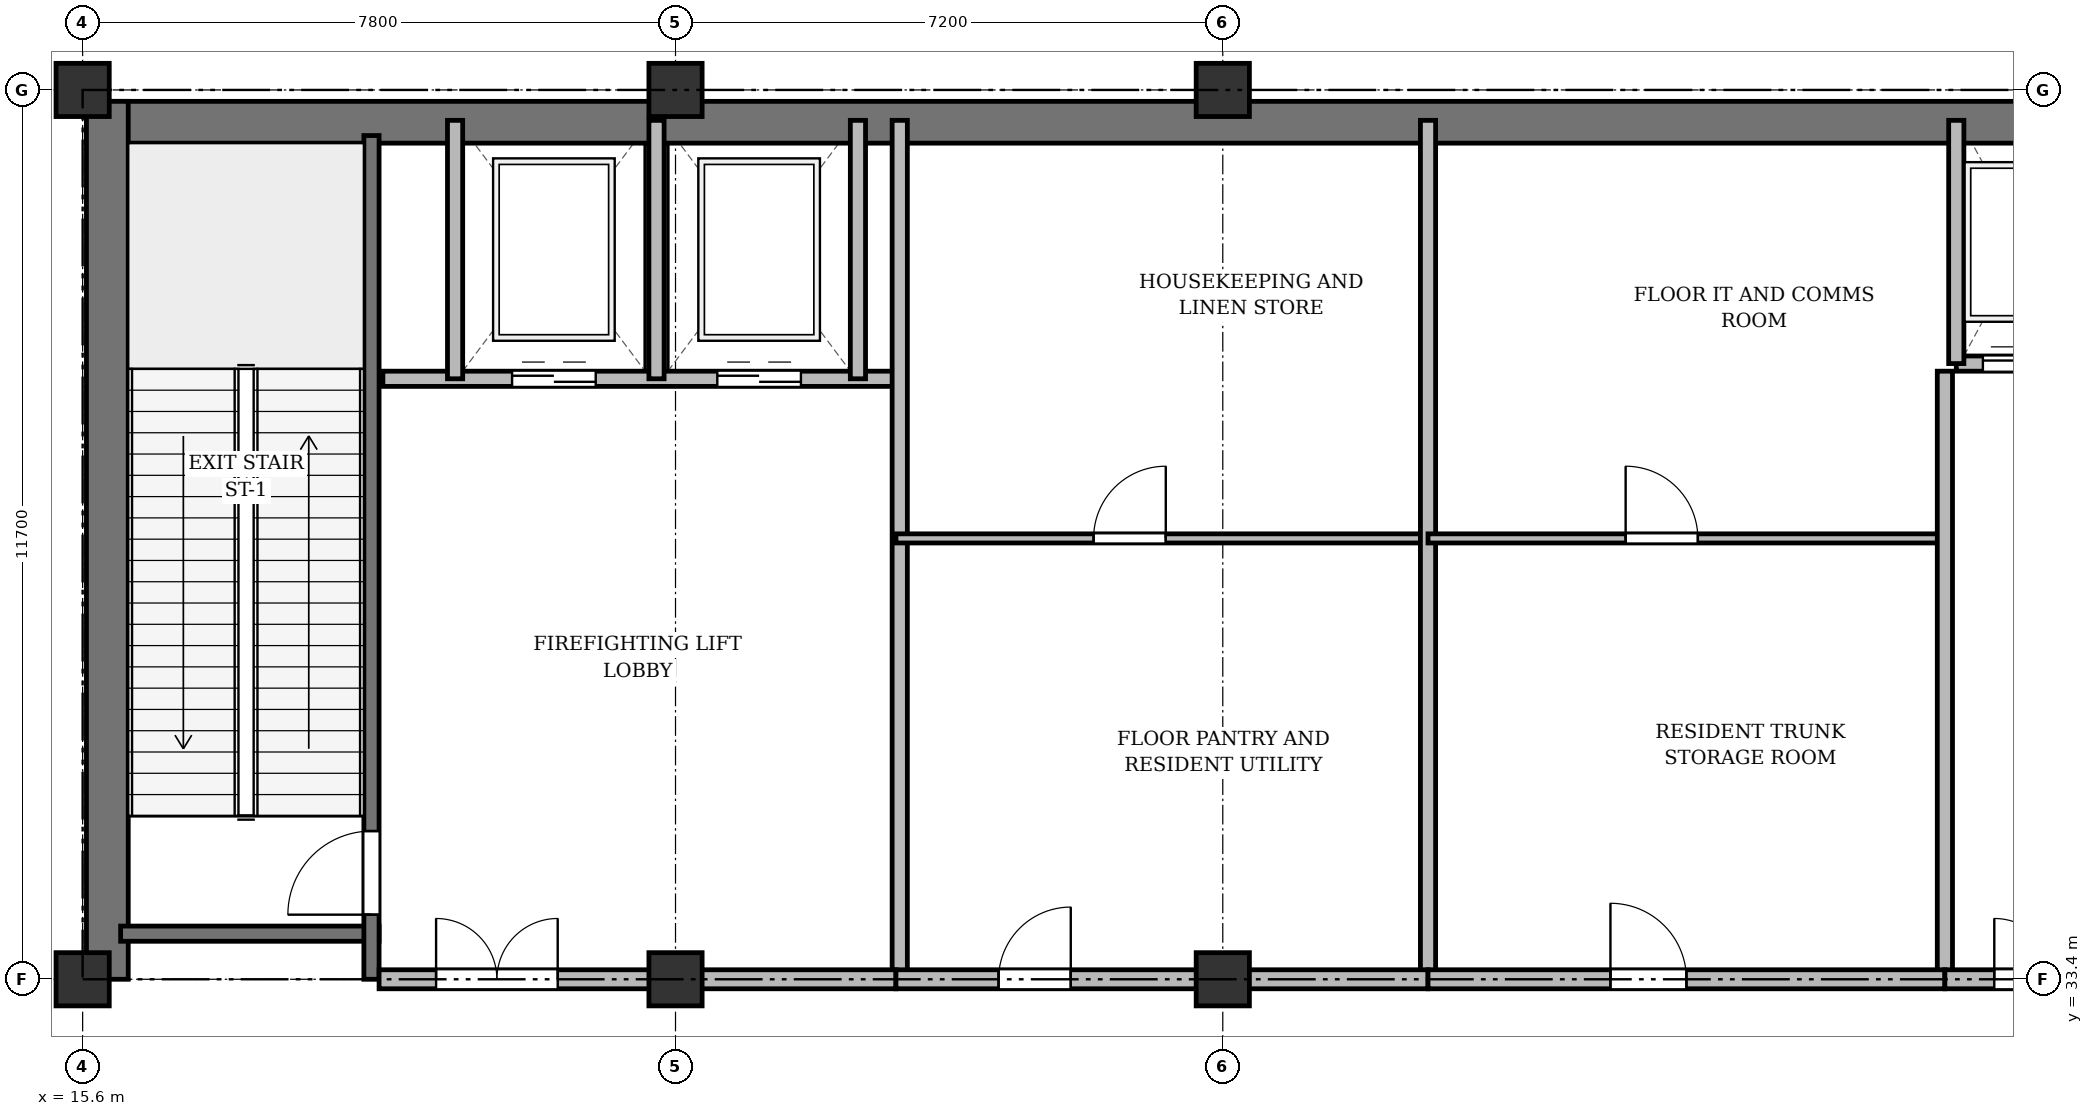
"""IFC4 building model, lengths in metres.
Left out: names, types, materials, properties, quantities, classifications, styles, units other than length and angle.
Written with IfcOpenShell. Run it as: python <this file> out.ifc"""

import sys

from ifc_helpers import new_model, si_unit, direction, frame, frame_2d, origin, origin_2d, place, context, subcontext, project, spatial, rectangle, extrude, source, transform, mapped, element, fill, save


model = new_model("IFC4")
c1 = context("Model", 3, precision=1e-05, world=origin(), true_north=direction((0.0, 1.0)))
c2 = subcontext(c1, "Body", "Model", "MODEL_VIEW")
j1 = project(units=[si_unit("LENGTHUNIT", "METRE"), si_unit("PLANEANGLEUNIT", "RADIAN")], contexts=[c1])
p1 = place(None, origin())
s1 = spatial("IfcSite", under=j1, at=p1, CompositionType="ELEMENT")
p2 = place(p1, origin())
s2 = spatial("IfcBuilding", under=s1, at=p2, CompositionType="ELEMENT")
p3 = place(p2, frame((0.0, 0.0, 240.9)))
s3 = spatial("IfcBuildingStorey", under=s2, at=p3, CompositionType="ELEMENT", Elevation=240.9)
m1 = source(origin(), c2, "Body", "SweptSolid", [
    extrude(rectangle(XDim=0.7, YDim=0.7, at=origin_2d()), origin(), (0.0, 0.0, 1.0), 7.8),
])
for number, where, z_axis, x_axis in (
    (1, (15.6, 33.4, 0.0), (0.0, 0.0, 1.0), (1.0, 0.0, 0.0)),
    (2, (15.6, 45.1, 0.0), (0.0, 0.0, 1.0), (1.0, 0.0, 0.0)),
    (3, (23.4, 33.4, 0.0), (0.0, 0.0, 1.0), (1.0, 0.0, 0.0)),
    (4, (23.4, 45.1, 0.0), (0.0, 0.0, 1.0), (1.0, 0.0, 0.0)),
    (5, (30.6, 33.4, 0.0), (0.0, 0.0, 1.0), (1.0, 0.0, 0.0)),
    (6, (30.6, 45.1, 0.0), (0.0, 0.0, 1.0), (1.0, 0.0, 0.0)),
):
    element("IfcColumn", number, at=place(p3, frame(where, z_axis=z_axis, x_axis=x_axis)), inside=s3, PredefinedType="COLUMN", context=c2, shape_type="MappedRepresentation", body=[
        mapped(m1, transform((0.0, 0.0, 0.0), x_axis=(1.0, 0.0, 0.0), y_axis=(0.0, 1.0, 0.0), z_axis=(0.0, 0.0, 1.0), scale=1.0)),
    ])
p4 = place(p3, frame((15.65, 44.675, 0.0), z_axis=(0.0, 0.0, 1.0), x_axis=(1.0, 0.0, 0.0)))
e7 = element("IfcWall", 7, at=p4, inside=s3, PredefinedType="SHEAR", context=c2, shape_type="SweptSolid", body=[
    extrude(rectangle(XDim=43.1, YDim=0.55, at=frame_2d((21.55, 0.0))), origin(), (0.0, 0.0, 1.0), 7.44),
])
p5 = place(p3, frame((15.925, 33.4, 0.0), z_axis=(0.0, 0.0, 1.0), x_axis=(0.0, 1.0, 0.0)))
e8 = element("IfcWall", 8, at=p5, inside=s3, PredefinedType="SHEAR", context=c2, shape_type="SweptSolid", body=[
    extrude(rectangle(XDim=11.55, YDim=0.55, at=frame_2d((5.775, 0.0))), origin(), (0.0, 0.0, 1.0), 7.44),
])
p6 = place(p3, frame((16.1, 34.0, 0.0), z_axis=(0.0, 0.0, 1.0), x_axis=(1.0, 0.0, 0.0)))
e9 = element("IfcWall", 9, at=p6, inside=s3, PredefinedType="SHEAR", context=c2, shape_type="SweptSolid", body=[
    extrude(rectangle(XDim=3.4, YDim=0.2, at=frame_2d((1.7, 0.0))), origin(), (0.0, 0.0, 1.0), 7.44),
])
p7 = place(p3, frame((19.4, 33.4, 0.0), z_axis=(0.0, 0.0, 1.0), x_axis=(0.0, 1.0, 0.0)))
e10 = element("IfcWall", 10, at=p7, inside=s3, PredefinedType="SHEAR", context=c2, shape_type="SweptSolid", body=[
    extrude(rectangle(XDim=11.1, YDim=0.2, at=frame_2d((5.55, 0.0))), origin(), (0.0, 0.0, 1.0), 7.44),
])
p8 = place(p7, frame((0.85, 0.0, 0.0)))
e11 = element("IfcOpeningElement", 11, at=p8, cuts=e10, PredefinedType="OPENING", context=c2, shape_type="SweptSolid", body=[
    extrude(rectangle(XDim=1.1, YDim=2.15, at=frame_2d((0.55, 1.075))), frame((0.0, 0.11, 0.0), z_axis=(0.0, -1.0, 0.0), x_axis=(1.0, 0.0, 0.0)), (0.0, 0.0, 1.0), 0.22),
])
p9 = place(p3, frame((19.55, 41.3, 0.0), z_axis=(0.0, 0.0, 1.0), x_axis=(1.0, 0.0, 0.0)))
e12 = element("IfcWall", 12, at=p9, inside=s3, PredefinedType="SOLIDWALL", context=c2, shape_type="SweptSolid", body=[
    extrude(rectangle(XDim=6.75, YDim=0.2, at=frame_2d((3.375, 0.0))), origin(), (0.0, 0.0, 1.0), 7.44),
])
p10 = place(p9, frame((1.7, 0.0, 0.0)))
e13 = element("IfcOpeningElement", 13, at=p10, cuts=e12, PredefinedType="OPENING", context=c2, shape_type="SweptSolid", body=[
    extrude(rectangle(XDim=1.1, YDim=2.15, at=frame_2d((0.55, 1.075))), frame((0.0, 0.11, 0.0), z_axis=(0.0, -1.0, 0.0), x_axis=(1.0, 0.0, 0.0)), (0.0, 0.0, 1.0), 0.22),
])
p11 = place(p9, frame((4.4, 0.0, 0.0)))
e14 = element("IfcOpeningElement", 14, at=p11, cuts=e12, PredefinedType="OPENING", context=c2, shape_type="SweptSolid", body=[
    extrude(rectangle(XDim=1.1, YDim=2.15, at=frame_2d((0.55, 1.075))), frame((0.0, 0.11, 0.0), z_axis=(0.0, -1.0, 0.0), x_axis=(1.0, 0.0, 0.0)), (0.0, 0.0, 1.0), 0.22),
])
for number, where, z_axis, x_axis in (
    (15, (20.5, 41.3, 0.0), (0.0, 0.0, 1.0), (0.0, 1.0, 0.0)),
    (16, (23.15, 41.3, 0.0), (0.0, 0.0, 1.0), (0.0, 1.0, 0.0)),
    (17, (25.8, 41.3, 0.0), (0.0, 0.0, 1.0), (0.0, 1.0, 0.0)),
):
    element("IfcWall", number, at=place(p3, frame(where, z_axis=z_axis, x_axis=x_axis)), inside=s3, PredefinedType="SOLIDWALL", context=c2, shape_type="SweptSolid", body=[
        extrude(rectangle(XDim=3.4, YDim=0.2, at=frame_2d((1.7, 0.0))), origin(), (0.0, 0.0, 1.0), 7.44),
    ])
p12 = place(p3, frame((26.35, 33.4, 0.0), z_axis=(0.0, 0.0, 1.0), x_axis=(0.0, 1.0, 0.0)))
e18 = element("IfcWall", 18, at=p12, inside=s3, PredefinedType="SOLIDWALL", context=c2, shape_type="SweptSolid", body=[
    extrude(rectangle(XDim=11.3, YDim=0.2, at=frame_2d((5.65, 0.0))), origin(), (0.0, 0.0, 1.0), 6.99),
])
p13 = place(p3, frame((19.5, 33.4, 0.0), z_axis=(0.0, 0.0, 1.0), x_axis=(1.0, 0.0, 0.0)))
e19 = element("IfcWall", 19, at=p13, inside=s3, PredefinedType="PARTITIONING", context=c2, shape_type="SweptSolid", body=[
    extrude(rectangle(XDim=6.8, YDim=0.25, at=frame_2d((3.4, 0.0))), origin(), (0.0, 0.0, 1.0), 6.99),
])
p14 = place(p13, frame((0.75, 0.0, 0.0)))
e20 = element("IfcOpeningElement", 20, at=p14, cuts=e19, PredefinedType="OPENING", context=c2, shape_type="SweptSolid", body=[
    extrude(rectangle(XDim=1.6, YDim=2.2, at=frame_2d((0.8, 1.1))), frame((0.0, 0.135, 0.0), z_axis=(0.0, -1.0, 0.0), x_axis=(1.0, 0.0, 0.0)), (0.0, 0.0, 1.0), 0.27),
])
p15 = place(p3, frame((26.3, 39.2, 0.0), z_axis=(0.0, 0.0, 1.0), x_axis=(1.0, 0.0, 0.0)))
e21 = element("IfcWall", 21, at=p15, inside=s3, PredefinedType="PARTITIONING", context=c2, shape_type="SweptSolid", body=[
    extrude(rectangle(XDim=7.0, YDim=0.12, at=frame_2d((3.5, 0.0))), origin(), (0.0, 0.0, 1.0), 6.94),
])
p16 = place(p15, frame((2.6, 0.0, 0.0)))
e22 = element("IfcOpeningElement", 22, at=p16, cuts=e21, PredefinedType="OPENING", context=c2, shape_type="SweptSolid", body=[
    extrude(rectangle(XDim=0.95, YDim=2.15, at=frame_2d((0.475, 1.075))), frame((0.0, 0.07, 0.0), z_axis=(0.0, -1.0, 0.0), x_axis=(1.0, 0.0, 0.0)), (0.0, 0.0, 1.0), 0.14),
])
p17 = place(p3, frame((33.3, 33.4, 0.0), z_axis=(0.0, 0.0, 1.0), x_axis=(0.0, 1.0, 0.0)))
e23 = element("IfcWall", 23, at=p17, inside=s3, PredefinedType="SOLIDWALL", context=c2, shape_type="SweptSolid", body=[
    extrude(rectangle(XDim=11.3, YDim=0.2, at=frame_2d((5.65, 0.0))), origin(), (0.0, 0.0, 1.0), 6.99),
])
p18 = place(p3, frame((33.3, 39.2, 0.0), z_axis=(0.0, 0.0, 1.0), x_axis=(1.0, 0.0, 0.0)))
e24 = element("IfcWall", 24, at=p18, inside=s3, PredefinedType="PARTITIONING", context=c2, shape_type="SweptSolid", body=[
    extrude(rectangle(XDim=6.8, YDim=0.12, at=frame_2d((3.4, 0.0))), origin(), (0.0, 0.0, 1.0), 7.44),
])
p19 = place(p18, frame((2.6, 0.0, 0.0)))
e25 = element("IfcOpeningElement", 25, at=p19, cuts=e24, PredefinedType="OPENING", context=c2, shape_type="SweptSolid", body=[
    extrude(rectangle(XDim=0.95, YDim=2.15, at=frame_2d((0.475, 1.075))), frame((0.0, 0.07, 0.0), z_axis=(0.0, -1.0, 0.0), x_axis=(1.0, 0.0, 0.0)), (0.0, 0.0, 1.0), 0.14),
])
p20 = place(p3, frame((40.1, 33.4, 0.0), z_axis=(0.0, 0.0, 1.0), x_axis=(0.0, 1.0, 0.0)))
e26 = element("IfcWall", 26, at=p20, inside=s3, PredefinedType="SOLIDWALL", context=c2, shape_type="SweptSolid", body=[
    extrude(rectangle(XDim=8.0, YDim=0.2, at=frame_2d((4.0, 0.0))), origin(), (0.0, 0.0, 1.0), 6.99),
])
p21 = place(p3, frame((40.25, 41.5, 0.0), z_axis=(0.0, 0.0, 1.0), x_axis=(1.0, 0.0, 0.0)))
e27 = element("IfcWall", 27, at=p21, inside=s3, PredefinedType="SOLIDWALL", context=c2, shape_type="SweptSolid", body=[
    extrude(rectangle(XDim=6.9, YDim=0.2, at=frame_2d((3.45, 0.0))), origin(), (0.0, 0.0, 1.0), 7.44),
])
p22 = place(p21, frame((0.35, 0.0, 0.0)))
e28 = element("IfcOpeningElement", 28, at=p22, cuts=e27, PredefinedType="OPENING", context=c2, shape_type="SweptSolid", body=[
    extrude(rectangle(XDim=1.05, YDim=2.15, at=frame_2d((0.525, 1.075))), frame((0.0, 0.11, 0.0), z_axis=(0.0, -1.0, 0.0), x_axis=(1.0, 0.0, 0.0)), (0.0, 0.0, 1.0), 0.22),
])
p23 = place(p21, frame((2.05, 0.0, 0.0)))
e29 = element("IfcOpeningElement", 29, at=p23, cuts=e27, PredefinedType="OPENING", context=c2, shape_type="SweptSolid", body=[
    extrude(rectangle(XDim=1.05, YDim=2.15, at=frame_2d((0.525, 1.075))), frame((0.0, 0.11, 0.0), z_axis=(0.0, -1.0, 0.0), x_axis=(1.0, 0.0, 0.0)), (0.0, 0.0, 1.0), 0.22),
])
p24 = place(p21, frame((3.75, 0.0, 0.0)))
e30 = element("IfcOpeningElement", 30, at=p24, cuts=e27, PredefinedType="OPENING", context=c2, shape_type="SweptSolid", body=[
    extrude(rectangle(XDim=1.05, YDim=2.15, at=frame_2d((0.525, 1.075))), frame((0.0, 0.11, 0.0), z_axis=(0.0, -1.0, 0.0), x_axis=(1.0, 0.0, 0.0)), (0.0, 0.0, 1.0), 0.22),
])
p25 = place(p21, frame((5.45, 0.0, 0.0)))
e31 = element("IfcOpeningElement", 31, at=p25, cuts=e27, PredefinedType="OPENING", context=c2, shape_type="SweptSolid", body=[
    extrude(rectangle(XDim=1.05, YDim=2.15, at=frame_2d((0.525, 1.075))), frame((0.0, 0.11, 0.0), z_axis=(0.0, -1.0, 0.0), x_axis=(1.0, 0.0, 0.0)), (0.0, 0.0, 1.0), 0.22),
])
p26 = place(p3, frame((40.25, 41.5, 0.0), z_axis=(0.0, 0.0, 1.0), x_axis=(0.0, 1.0, 0.0)))
e32 = element("IfcWall", 32, at=p26, inside=s3, PredefinedType="SOLIDWALL", context=c2, shape_type="SweptSolid", body=[
    extrude(rectangle(XDim=3.2, YDim=0.2, at=frame_2d((1.6, 0.0))), origin(), (0.0, 0.0, 1.0), 7.44),
])
p27 = place(p3, frame((26.3, 33.4, 0.0), z_axis=(0.0, 0.0, 1.0), x_axis=(1.0, 0.0, 0.0)))
e33 = element("IfcWall", 33, at=p27, inside=s3, PredefinedType="PARTITIONING", context=c2, shape_type="SweptSolid", body=[
    extrude(rectangle(XDim=7.0, YDim=0.25, at=frame_2d((3.5, 0.0))), origin(), (0.0, 0.0, 1.0), 6.99),
])
p28 = place(p27, frame((1.35, 0.0, 0.0)))
e34 = element("IfcOpeningElement", 34, at=p28, cuts=e33, PredefinedType="OPENING", context=c2, shape_type="SweptSolid", body=[
    extrude(rectangle(XDim=0.95, YDim=2.15, at=frame_2d((0.475, 1.075))), frame((0.0, 0.135, 0.0), z_axis=(0.0, -1.0, 0.0), x_axis=(1.0, 0.0, 0.0)), (0.0, 0.0, 1.0), 0.27),
])
p29 = place(p3, frame((33.3, 33.4, 0.0), z_axis=(0.0, 0.0, 1.0), x_axis=(1.0, 0.0, 0.0)))
e35 = element("IfcWall", 35, at=p29, inside=s3, PredefinedType="PARTITIONING", context=c2, shape_type="SweptSolid", body=[
    extrude(rectangle(XDim=6.8, YDim=0.25, at=frame_2d((3.4, 0.0))), origin(), (0.0, 0.0, 1.0), 6.99),
])
p30 = place(p29, frame((2.4, 0.0, 0.0)))
e36 = element("IfcOpeningElement", 36, at=p30, cuts=e35, PredefinedType="OPENING", context=c2, shape_type="SweptSolid", body=[
    extrude(rectangle(XDim=1.0, YDim=2.15, at=frame_2d((0.5, 1.075))), frame((0.0, 0.135, 0.0), z_axis=(0.0, -1.0, 0.0), x_axis=(1.0, 0.0, 0.0)), (0.0, 0.0, 1.0), 0.27),
])
p31 = place(p3, frame((40.1, 33.4, 0.0), z_axis=(0.0, 0.0, 1.0), x_axis=(1.0, 0.0, 0.0)))
e37 = element("IfcWall", 37, at=p31, inside=s3, PredefinedType="PARTITIONING", context=c2, shape_type="SweptSolid", body=[
    extrude(rectangle(XDim=7.05, YDim=0.25, at=frame_2d((3.525, 0.0))), origin(), (0.0, 0.0, 1.0), 6.99),
])
p32 = place(p31, frame((0.65, 0.0, 0.0)))
e38 = element("IfcOpeningElement", 38, at=p32, cuts=e37, PredefinedType="OPENING", context=c2, shape_type="SweptSolid", body=[
    extrude(rectangle(XDim=1.6, YDim=2.2, at=frame_2d((0.8, 1.1))), frame((0.0, 0.135, 0.0), z_axis=(0.0, -1.0, 0.0), x_axis=(1.0, 0.0, 0.0)), (0.0, 0.0, 1.0), 0.27),
])
m2 = source(origin(), c2, "Body", "SweptSolid", [
    extrude(rectangle(XDim=1.1, YDim=2.15, at=frame_2d((0.55, 1.075))), frame((0.0, 0.025, 0.0), z_axis=(0.0, -1.0, 0.0), x_axis=(1.0, 0.0, 0.0)), (0.0, 0.0, 1.0), 0.05),
])
p33 = place(p8, origin())
e39 = element("IfcDoor", 39, at=p33, inside=s3, OperationType="SINGLE_SWING_LEFT", PredefinedType="DOOR", context=c2, shape_type="MappedRepresentation", body=[
    mapped(m2, transform((0.0, 0.0, 0.0), x_axis=(1.0, 0.0, 0.0), y_axis=(0.0, 1.0, 0.0), z_axis=(0.0, 0.0, 1.0), scale=1.0)),
])
fill(e11, e39)
p34 = place(p10, origin())
e40 = element("IfcDoor", 40, at=p34, inside=s3, OperationType="DOUBLE_DOOR_SLIDING", PredefinedType="DOOR", context=c2, shape_type="MappedRepresentation", body=[
    mapped(m2, transform((0.0, 0.0, 0.0), x_axis=(1.0, 0.0, 0.0), y_axis=(0.0, 1.0, 0.0), z_axis=(0.0, 0.0, 1.0), scale=1.0)),
])
fill(e13, e40)
p35 = place(p11, origin())
e41 = element("IfcDoor", 41, at=p35, inside=s3, OperationType="DOUBLE_DOOR_SLIDING", PredefinedType="DOOR", context=c2, shape_type="MappedRepresentation", body=[
    mapped(m2, transform((0.0, 0.0, 0.0), x_axis=(1.0, 0.0, 0.0), y_axis=(0.0, 1.0, 0.0), z_axis=(0.0, 0.0, 1.0), scale=1.0)),
])
fill(e14, e41)
m3 = source(origin(), c2, "Body", "SweptSolid", [
    extrude(rectangle(XDim=1.6, YDim=2.2, at=frame_2d((0.8, 1.1))), frame((0.0, 0.025, 0.0), z_axis=(0.0, -1.0, 0.0), x_axis=(1.0, 0.0, 0.0)), (0.0, 0.0, 1.0), 0.05),
])
p36 = place(p14, origin())
e42 = element("IfcDoor", 42, at=p36, inside=s3, OperationType="DOUBLE_DOOR_SINGLE_SWING", PredefinedType="DOOR", context=c2, shape_type="MappedRepresentation", body=[
    mapped(m3, transform((0.0, 0.0, 0.0), x_axis=(1.0, 0.0, 0.0), y_axis=(0.0, 1.0, 0.0), z_axis=(0.0, 0.0, 1.0), scale=1.0)),
])
fill(e20, e42)
m4 = source(origin(), c2, "Body", "SweptSolid", [
    extrude(rectangle(XDim=0.95, YDim=2.15, at=frame_2d((0.475, 1.075))), frame((0.0, 0.025, 0.0), z_axis=(0.0, -1.0, 0.0), x_axis=(1.0, 0.0, 0.0)), (0.0, 0.0, 1.0), 0.05),
])
p37 = place(p16, origin())
e43 = element("IfcDoor", 43, at=p37, inside=s3, OperationType="SINGLE_SWING_RIGHT", PredefinedType="DOOR", context=c2, shape_type="MappedRepresentation", body=[
    mapped(m4, transform((0.0, 0.0, 0.0), x_axis=(1.0, 0.0, 0.0), y_axis=(0.0, 1.0, 0.0), z_axis=(0.0, 0.0, 1.0), scale=1.0)),
])
fill(e22, e43)
p38 = place(p19, origin())
e44 = element("IfcDoor", 44, at=p38, inside=s3, OperationType="SINGLE_SWING_LEFT", PredefinedType="DOOR", context=c2, shape_type="MappedRepresentation", body=[
    mapped(m4, transform((0.0, 0.0, 0.0), x_axis=(1.0, 0.0, 0.0), y_axis=(0.0, 1.0, 0.0), z_axis=(0.0, 0.0, 1.0), scale=1.0)),
])
fill(e25, e44)
m5 = source(origin(), c2, "Body", "SweptSolid", [
    extrude(rectangle(XDim=1.05, YDim=2.15, at=frame_2d((0.525, 1.075))), frame((0.0, 0.025, 0.0), z_axis=(0.0, -1.0, 0.0), x_axis=(1.0, 0.0, 0.0)), (0.0, 0.0, 1.0), 0.05),
])
p39 = place(p22, origin())
e45 = element("IfcDoor", 45, at=p39, inside=s3, OperationType="DOUBLE_DOOR_SLIDING", PredefinedType="DOOR", context=c2, shape_type="MappedRepresentation", body=[
    mapped(m5, transform((0.0, 0.0, 0.0), x_axis=(1.0, 0.0, 0.0), y_axis=(0.0, 1.0, 0.0), z_axis=(0.0, 0.0, 1.0), scale=1.0)),
])
fill(e28, e45)
p40 = place(p28, origin())
e46 = element("IfcDoor", 46, at=p40, inside=s3, OperationType="SINGLE_SWING_RIGHT", PredefinedType="DOOR", context=c2, shape_type="MappedRepresentation", body=[
    mapped(m4, transform((0.0, 0.0, 0.0), x_axis=(1.0, 0.0, 0.0), y_axis=(0.0, 1.0, 0.0), z_axis=(0.0, 0.0, 1.0), scale=1.0)),
])
fill(e34, e46)
m6 = source(origin(), c2, "Body", "SweptSolid", [
    extrude(rectangle(XDim=1.0, YDim=2.15, at=frame_2d((0.5, 1.075))), frame((0.0, 0.025, 0.0), z_axis=(0.0, -1.0, 0.0), x_axis=(1.0, 0.0, 0.0)), (0.0, 0.0, 1.0), 0.05),
])
p41 = place(p30, origin())
e47 = element("IfcDoor", 47, at=p41, inside=s3, OperationType="SINGLE_SWING_LEFT", PredefinedType="DOOR", context=c2, shape_type="MappedRepresentation", body=[
    mapped(m6, transform((0.0, 0.0, 0.0), x_axis=(1.0, 0.0, 0.0), y_axis=(0.0, 1.0, 0.0), z_axis=(0.0, 0.0, 1.0), scale=1.0)),
])
fill(e36, e47)
p42 = place(p32, origin())
e48 = element("IfcDoor", 48, at=p42, inside=s3, OperationType="DOUBLE_DOOR_SINGLE_SWING", PredefinedType="DOOR", context=c2, shape_type="MappedRepresentation", body=[
    mapped(m3, transform((0.0, 0.0, 0.0), x_axis=(1.0, 0.0, 0.0), y_axis=(0.0, 1.0, 0.0), z_axis=(0.0, 0.0, 1.0), scale=1.0)),
])
fill(e38, e48)
save(model, sys.argv[1])
